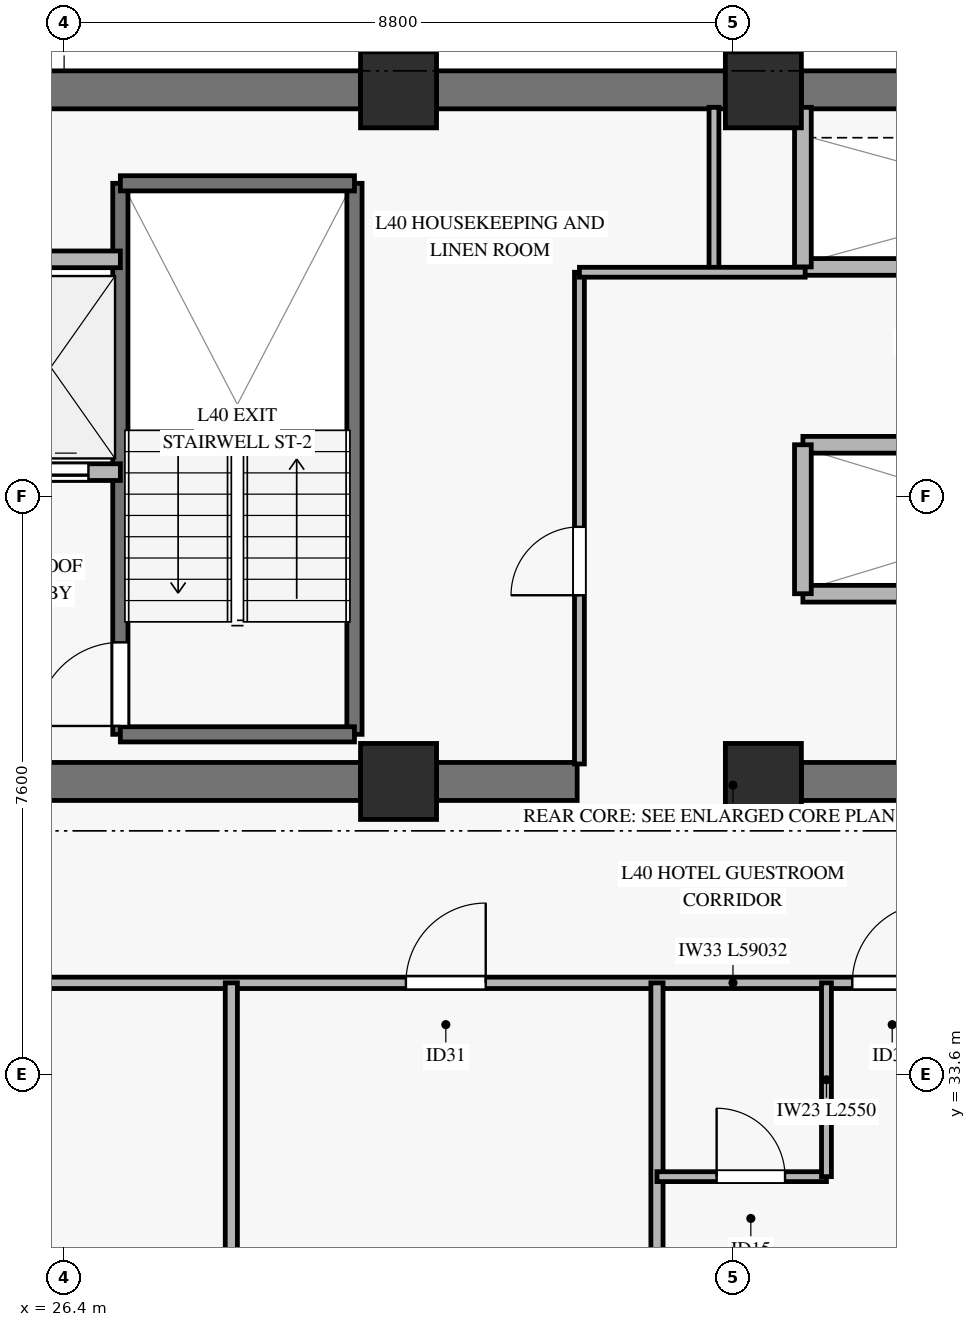
"""IFC4 building model, lengths in metres.
Left out: names, types, materials, properties, quantities, classifications, styles, units other than length and angle.
Written with IfcOpenShell. Run it as: python <this file> out.ifc"""

import sys

from ifc_helpers import new_model, si_unit, direction, frame, frame_2d, origin, origin_2d, place, context, subcontext, project, spatial, rectangle, extrude, source, transform, mapped, element, fill, save


model = new_model("IFC4")
c1 = context("Model", 3, precision=1e-05, world=origin(), true_north=direction((0.0, 1.0)))
c2 = subcontext(c1, "Body", "Model", "MODEL_VIEW")
j1 = project(units=[si_unit("LENGTHUNIT", "METRE"), si_unit("PLANEANGLEUNIT", "RADIAN")], contexts=[c1])
p1 = place(None, origin())
s1 = spatial("IfcSite", under=j1, at=p1, CompositionType="ELEMENT")
p2 = place(p1, origin())
s2 = spatial("IfcBuilding", under=s1, at=p2, CompositionType="ELEMENT")
p3 = place(p2, frame((0.0, 0.0, 163.2)))
s3 = spatial("IfcBuildingStorey", under=s2, at=p3, CompositionType="ELEMENT", Elevation=163.2)
m1 = source(origin(), c2, "Body", "SweptSolid", [
    extrude(rectangle(XDim=1.0, YDim=1.0, at=origin_2d()), origin(), (0.0, 0.0, 1.0), 3.27),
])
for number, where, z_axis, x_axis in (
    (1, (30.8, 37.45, 0.0), (0.0, 0.0, 1.0), (1.0, 0.0, 0.0)),
    (2, (30.8, 46.55, 0.0), (0.0, 0.0, 1.0), (1.0, 0.0, 0.0)),
    (3, (35.6, 37.45, 0.0), (0.0, 0.0, 1.0), (1.0, 0.0, 0.0)),
    (4, (35.6, 46.55, 0.0), (0.0, 0.0, 1.0), (1.0, 0.0, 0.0)),
):
    element("IfcColumn", number, at=place(p3, frame(where, z_axis=z_axis, x_axis=x_axis)), inside=s3, PredefinedType="PILASTER", context=c2, shape_type="MappedRepresentation", body=[
        mapped(m1, transform((0.0, 0.0, 0.0), x_axis=(1.0, 0.0, 0.0), y_axis=(0.0, 1.0, 0.0), z_axis=(0.0, 0.0, 1.0), scale=1.0)),
    ])
p4 = place(p3, frame((20.35, 46.55, 0.0), z_axis=(0.0, 0.0, 1.0), x_axis=(1.0, 0.0, 0.0)))
e5 = element("IfcWall", 5, at=p4, inside=s3, PredefinedType="SHEAR", context=c2, shape_type="SweptSolid", body=[
    extrude(rectangle(XDim=9.95, YDim=0.5, at=frame_2d((4.975, 0.0))), origin(), (0.0, 0.0, 1.0), 3.27),
])
p5 = place(p3, frame((31.3, 46.55, 0.0), z_axis=(0.0, 0.0, 1.0), x_axis=(1.0, 0.0, 0.0)))
e6 = element("IfcWall", 6, at=p5, inside=s3, PredefinedType="SHEAR", context=c2, shape_type="SweptSolid", body=[
    extrude(rectangle(XDim=3.8, YDim=0.5, at=frame_2d((1.9, 0.0))), origin(), (0.0, 0.0, 1.0), 3.27),
])
p6 = place(p3, frame((36.1, 46.55, 0.0), z_axis=(0.0, 0.0, 1.0), x_axis=(1.0, 0.0, 0.0)))
e7 = element("IfcWall", 7, at=p6, inside=s3, PredefinedType="SHEAR", context=c2, shape_type="SweptSolid", body=[
    extrude(rectangle(XDim=7.7, YDim=0.5, at=frame_2d((3.85, 0.0))), origin(), (0.0, 0.0, 1.0), 3.27),
])
p7 = place(p3, frame((20.35, 37.45, 0.0), z_axis=(0.0, 0.0, 1.0), x_axis=(1.0, 0.0, 0.0)))
e8 = element("IfcWall", 8, at=p7, inside=s3, PredefinedType="SHEAR", context=c2, shape_type="SweptSolid", body=[
    extrude(rectangle(XDim=9.95, YDim=0.5, at=frame_2d((4.975, 0.0))), origin(), (0.0, 0.0, 1.0), 3.27),
])
p8 = place(p7, frame((4.2, 0.0, 0.0)))
e9 = element("IfcOpeningElement", 9, at=p8, cuts=e8, PredefinedType="OPENING", context=c2, shape_type="SweptSolid", body=[
    extrude(rectangle(XDim=1.2, YDim=2.15, at=frame_2d((0.6, 1.075))), frame((0.0, 0.26, 0.0), z_axis=(0.0, -1.0, 0.0), x_axis=(1.0, 0.0, 0.0)), (0.0, 0.0, 1.0), 0.52),
])
p9 = place(p3, frame((31.3, 37.45, 0.0), z_axis=(0.0, 0.0, 1.0), x_axis=(1.0, 0.0, 0.0)))
e10 = element("IfcWall", 10, at=p9, inside=s3, PredefinedType="SHEAR", context=c2, shape_type="SweptSolid", body=[
    extrude(rectangle(XDim=1.85, YDim=0.5, at=frame_2d((0.925, 0.0))), origin(), (0.0, 0.0, 1.0), 3.27),
])
p10 = place(p3, frame((36.1, 37.45, 0.0), z_axis=(0.0, 0.0, 1.0), x_axis=(1.0, 0.0, 0.0)))
e11 = element("IfcWall", 11, at=p10, inside=s3, PredefinedType="SHEAR", context=c2, shape_type="SweptSolid", body=[
    extrude(rectangle(XDim=7.7, YDim=0.5, at=frame_2d((3.85, 0.0))), origin(), (0.0, 0.0, 1.0), 3.27),
])
p11 = place(p3, frame((27.14, 38.07, 0.0), z_axis=(0.0, 0.0, 1.0), x_axis=(0.0, 1.0, 0.0)))
e12 = element("IfcWall", 12, at=p11, inside=s3, PredefinedType="SOLIDWALL", context=c2, shape_type="SweptSolid", body=[
    extrude(rectangle(XDim=7.25, YDim=0.2, at=frame_2d((3.625, 0.0))), origin(), (0.0, 0.0, 1.0), 3.5),
])
p12 = place(p11, frame((0.11, 0.0, 0.0)))
e13 = element("IfcOpeningElement", 13, at=p12, cuts=e12, PredefinedType="OPENING", context=c2, shape_type="SweptSolid", body=[
    extrude(rectangle(XDim=1.1, YDim=2.15, at=frame_2d((0.55, 1.075))), frame((0.0, 0.11, 0.0), z_axis=(0.0, -1.0, 0.0), x_axis=(1.0, 0.0, 0.0)), (0.0, 0.0, 1.0), 0.22),
])
p13 = place(p3, frame((30.22, 38.07, 0.0), z_axis=(0.0, 0.0, 1.0), x_axis=(0.0, 1.0, 0.0)))
e14 = element("IfcWall", 14, at=p13, inside=s3, PredefinedType="SOLIDWALL", context=c2, shape_type="SweptSolid", body=[
    extrude(rectangle(XDim=7.25, YDim=0.2, at=frame_2d((3.625, 0.0))), origin(), (0.0, 0.0, 1.0), 3.5),
])
for number, where, z_axis, x_axis in (
    (15, (27.14, 45.32, 0.0), (0.0, 0.0, 1.0), (1.0, 0.0, 0.0)),
    (16, (27.14, 38.07, 0.0), (0.0, 0.0, 1.0), (1.0, 0.0, 0.0)),
):
    element("IfcWall", number, at=place(p3, frame(where, z_axis=z_axis, x_axis=x_axis)), inside=s3, PredefinedType="SOLIDWALL", context=c2, shape_type="SweptSolid", body=[
        extrude(rectangle(XDim=3.08, YDim=0.2, at=frame_2d((1.54, 0.0))), origin(), (0.0, 0.0, 1.0), 3.5),
    ])
p14 = place(p3, frame((23.22, 41.52, 0.0), z_axis=(0.0, 0.0, 1.0), x_axis=(1.0, 0.0, 0.0)))
e17 = element("IfcWall", 17, at=p14, inside=s3, PredefinedType="SOLIDWALL", context=c2, shape_type="SweptSolid", body=[
    extrude(rectangle(XDim=3.92, YDim=0.22, at=frame_2d((1.96, 0.0))), origin(), (0.0, 0.0, 1.0), 3.27),
])
p15 = place(p14, frame((0.5, 0.0, 0.0)))
e18 = element("IfcOpeningElement", 18, at=p15, cuts=e17, PredefinedType="OPENING", context=c2, shape_type="SweptSolid", body=[
    extrude(rectangle(XDim=1.1, YDim=2.2, at=frame_2d((0.55, 1.1))), frame((0.0, 0.12, 0.0), z_axis=(0.0, -1.0, 0.0), x_axis=(1.0, 0.0, 0.0)), (0.0, 0.0, 1.0), 0.24),
])
p16 = place(p14, frame((2.4, 0.0, 0.0)))
e19 = element("IfcOpeningElement", 19, at=p16, cuts=e17, PredefinedType="OPENING", context=c2, shape_type="SweptSolid", body=[
    extrude(rectangle(XDim=1.1, YDim=2.2, at=frame_2d((0.55, 1.1))), frame((0.0, 0.12, 0.0), z_axis=(0.0, -1.0, 0.0), x_axis=(1.0, 0.0, 0.0)), (0.0, 0.0, 1.0), 0.24),
])
p17 = place(p3, frame((23.22, 44.32, 0.0), z_axis=(0.0, 0.0, 1.0), x_axis=(1.0, 0.0, 0.0)))
e20 = element("IfcWall", 20, at=p17, inside=s3, PredefinedType="SOLIDWALL", context=c2, shape_type="SweptSolid", body=[
    extrude(rectangle(XDim=3.92, YDim=0.22, at=frame_2d((1.96, 0.0))), origin(), (0.0, 0.0, 1.0), 3.27),
])
p18 = place(p3, frame((36.12, 44.22, 0.0), z_axis=(0.0, 0.0, 1.0), x_axis=(1.0, 0.0, 0.0)))
e21 = element("IfcWall", 21, at=p18, inside=s3, PredefinedType="SOLIDWALL", context=c2, shape_type="SweptSolid", body=[
    extrude(rectangle(XDim=6.2, YDim=0.22, at=frame_2d((3.1, 0.0))), origin(), (0.0, 0.0, 1.0), 3.27),
])
p19 = place(p18, frame((3.28, 0.0, 0.0)))
e22 = element("IfcOpeningElement", 22, at=p19, cuts=e21, PredefinedType="OPENING", context=c2, shape_type="SweptSolid", body=[
    extrude(rectangle(XDim=1.1, YDim=2.2, at=frame_2d((0.55, 1.1))), frame((0.0, 0.12, 0.0), z_axis=(0.0, -1.0, 0.0), x_axis=(1.0, 0.0, 0.0)), (0.0, 0.0, 1.0), 0.24),
])
p20 = place(p18, frame((4.77, 0.0, 0.0)))
e23 = element("IfcOpeningElement", 23, at=p20, cuts=e21, PredefinedType="OPENING", context=c2, shape_type="SweptSolid", body=[
    extrude(rectangle(XDim=1.1, YDim=2.2, at=frame_2d((0.55, 1.1))), frame((0.0, 0.12, 0.0), z_axis=(0.0, -1.0, 0.0), x_axis=(1.0, 0.0, 0.0)), (0.0, 0.0, 1.0), 0.24),
])
p21 = place(p3, frame((36.12, 41.88, 0.0), z_axis=(0.0, 0.0, 1.0), x_axis=(1.0, 0.0, 0.0)))
e24 = element("IfcWall", 24, at=p21, inside=s3, PredefinedType="SOLIDWALL", context=c2, shape_type="SweptSolid", body=[
    extrude(rectangle(XDim=6.2, YDim=0.22, at=frame_2d((3.1, 0.0))), origin(), (0.0, 0.0, 1.0), 3.27),
])
p22 = place(p21, frame((3.28, 0.0, 0.0)))
e25 = element("IfcOpeningElement", 25, at=p22, cuts=e24, PredefinedType="OPENING", context=c2, shape_type="SweptSolid", body=[
    extrude(rectangle(XDim=1.1, YDim=2.2, at=frame_2d((0.55, 1.1))), frame((0.0, 0.12, 0.0), z_axis=(0.0, -1.0, 0.0), x_axis=(1.0, 0.0, 0.0)), (0.0, 0.0, 1.0), 0.24),
])
p23 = place(p21, frame((4.77, 0.0, 0.0)))
e26 = element("IfcOpeningElement", 26, at=p23, cuts=e24, PredefinedType="OPENING", context=c2, shape_type="SweptSolid", body=[
    extrude(rectangle(XDim=1.1, YDim=2.2, at=frame_2d((0.55, 1.1))), frame((0.0, 0.12, 0.0), z_axis=(0.0, -1.0, 0.0), x_axis=(1.0, 0.0, 0.0)), (0.0, 0.0, 1.0), 0.24),
])
p24 = place(p3, frame((36.12, 39.92, 0.0), z_axis=(0.0, 0.0, 1.0), x_axis=(1.0, 0.0, 0.0)))
e27 = element("IfcWall", 27, at=p24, inside=s3, PredefinedType="SOLIDWALL", context=c2, shape_type="SweptSolid", body=[
    extrude(rectangle(XDim=8.6, YDim=0.22, at=frame_2d((4.3, 0.0))), origin(), (0.0, 0.0, 1.0), 2.555),
])
p25 = place(p3, frame((36.12, 39.92, 0.0), z_axis=(0.0, 0.0, 1.0), x_axis=(0.0, 1.0, 0.0)))
e28 = element("IfcWall", 28, at=p25, inside=s3, PredefinedType="SOLIDWALL", context=c2, shape_type="SweptSolid", body=[
    extrude(rectangle(XDim=1.96, YDim=0.22, at=frame_2d((0.98, 0.0))), origin(), (0.0, 0.0, 1.0), 3.27),
])
p26 = place(p3, frame((36.12, 44.22, 0.0), z_axis=(0.0, 0.0, 1.0), x_axis=(0.0, 1.0, 0.0)))
e29 = element("IfcWall", 29, at=p26, inside=s3, PredefinedType="SOLIDWALL", context=c2, shape_type="SweptSolid", body=[
    extrude(rectangle(XDim=2.1, YDim=0.22, at=frame_2d((1.05, 0.0))), origin(), (0.0, 0.0, 1.0), 3.27),
])
p27 = place(p3, frame((33.18, 37.68, 0.0), z_axis=(0.0, 0.0, 1.0), x_axis=(0.0, 1.0, 0.0)))
e30 = element("IfcWall", 30, at=p27, inside=s3, PredefinedType="PARTITIONING", context=c2, shape_type="SweptSolid", body=[
    extrude(rectangle(XDim=6.47, YDim=0.13, at=frame_2d((3.235, 0.0))), origin(), (0.0, 0.0, 1.0), 2.355),
])
p28 = place(p27, frame((2.22, 0.0, 0.0)))
e31 = element("IfcOpeningElement", 31, at=p28, cuts=e30, PredefinedType="OPENING", context=c2, shape_type="SweptSolid", body=[
    extrude(rectangle(XDim=0.9, YDim=2.1, at=frame_2d((0.45, 1.05))), frame((0.0, 0.075, 0.0), z_axis=(0.0, -1.0, 0.0), x_axis=(1.0, 0.0, 0.0)), (0.0, 0.0, 1.0), 0.15),
])
p29 = place(p3, frame((34.95, 44.15, 0.0), z_axis=(0.0, 0.0, 1.0), x_axis=(0.0, 1.0, 0.0)))
e32 = element("IfcWall", 32, at=p29, inside=s3, PredefinedType="PARTITIONING", context=c2, shape_type="SweptSolid", body=[
    extrude(rectangle(XDim=2.17, YDim=0.13, at=frame_2d((1.085, 0.0))), origin(), (0.0, 0.0, 1.0), 3.27),
])
p30 = place(p3, frame((33.18, 44.15, 0.0), z_axis=(0.0, 0.0, 1.0), x_axis=(1.0, 0.0, 0.0)))
e33 = element("IfcWall", 33, at=p30, inside=s3, PredefinedType="PARTITIONING", context=c2, shape_type="SweptSolid", body=[
    extrude(rectangle(XDim=2.97, YDim=0.13, at=frame_2d((1.485, 0.0))), origin(), (0.0, 0.0, 1.0), 2.555),
])
p31 = place(p3, frame((5.684, 34.8, 0.0), z_axis=(0.0, 0.0, 1.0), x_axis=(1.0, 0.0, 0.0)))
e34 = element("IfcWall", 34, at=p31, inside=s3, PredefinedType="PARTITIONING", context=c2, shape_type="SweptSolid", body=[
    extrude(rectangle(XDim=59.032, YDim=0.15, at=frame_2d((29.516, 0.0))), origin(), (0.0, 0.0, 1.0), 2.455),
])
p32 = place(p31, frame((6.645, 0.0, 0.0)))
e35 = element("IfcOpeningElement", 35, at=p32, cuts=e34, PredefinedType="OPENING", context=c2, shape_type="SweptSolid", body=[
    extrude(rectangle(XDim=1.05, YDim=2.15, at=frame_2d((0.525, 1.075))), frame((0.0, 0.085, 0.0), z_axis=(0.0, -1.0, 0.0), x_axis=(1.0, 0.0, 0.0)), (0.0, 0.0, 1.0), 0.17),
])
p33 = place(p31, frame((19.241, 0.0, 0.0)))
e36 = element("IfcOpeningElement", 36, at=p33, cuts=e34, PredefinedType="OPENING", context=c2, shape_type="SweptSolid", body=[
    extrude(rectangle(XDim=1.05, YDim=2.15, at=frame_2d((0.525, 1.075))), frame((0.0, 0.085, 0.0), z_axis=(0.0, -1.0, 0.0), x_axis=(1.0, 0.0, 0.0)), (0.0, 0.0, 1.0), 0.17),
])
p34 = place(p31, frame((25.213, 0.0, 0.0)))
e37 = element("IfcOpeningElement", 37, at=p34, cuts=e34, PredefinedType="OPENING", context=c2, shape_type="SweptSolid", body=[
    extrude(rectangle(XDim=1.05, YDim=2.15, at=frame_2d((0.525, 1.075))), frame((0.0, 0.085, 0.0), z_axis=(0.0, -1.0, 0.0), x_axis=(1.0, 0.0, 0.0)), (0.0, 0.0, 1.0), 0.17),
])
p35 = place(p31, frame((31.086, 0.0, 0.0)))
e38 = element("IfcOpeningElement", 38, at=p35, cuts=e34, PredefinedType="OPENING", context=c2, shape_type="SweptSolid", body=[
    extrude(rectangle(XDim=1.05, YDim=2.15, at=frame_2d((0.525, 1.075))), frame((0.0, 0.085, 0.0), z_axis=(0.0, -1.0, 0.0), x_axis=(1.0, 0.0, 0.0)), (0.0, 0.0, 1.0), 0.17),
])
p36 = place(p31, frame((36.632, 0.0, 0.0)))
e39 = element("IfcOpeningElement", 39, at=p36, cuts=e34, PredefinedType="OPENING", context=c2, shape_type="SweptSolid", body=[
    extrude(rectangle(XDim=1.05, YDim=2.15, at=frame_2d((0.525, 1.075))), frame((0.0, 0.085, 0.0), z_axis=(0.0, -1.0, 0.0), x_axis=(1.0, 0.0, 0.0)), (0.0, 0.0, 1.0), 0.17),
])
p37 = place(p31, frame((47.025, 0.0, 0.0)))
e40 = element("IfcOpeningElement", 40, at=p37, cuts=e34, PredefinedType="OPENING", context=c2, shape_type="SweptSolid", body=[
    extrude(rectangle(XDim=1.05, YDim=2.15, at=frame_2d((0.525, 1.075))), frame((0.0, 0.085, 0.0), z_axis=(0.0, -1.0, 0.0), x_axis=(1.0, 0.0, 0.0)), (0.0, 0.0, 1.0), 0.17),
])
for number, where, z_axis, x_axis in (
    (41, (28.6, 9.098, 0.0), (0.0, 0.0, 1.0), (0.0, 1.0, 0.0)),
    (42, (34.2, 9.098, 0.0), (0.0, 0.0, 1.0), (0.0, 1.0, 0.0)),
):
    element("IfcWall", number, at=place(p3, frame(where, z_axis=z_axis, x_axis=x_axis)), inside=s3, PredefinedType="PARTITIONING", context=c2, shape_type="SweptSolid", body=[
        extrude(rectangle(XDim=25.702, YDim=0.16, at=frame_2d((12.851, 0.0))), origin(), (0.0, 0.0, 1.0), 2.755),
    ])
p38 = place(p3, frame((34.2, 32.25, 0.0), z_axis=(0.0, 0.0, 1.0), x_axis=(1.0, 0.0, 0.0)))
e43 = element("IfcWall", 43, at=p38, inside=s3, PredefinedType="PARTITIONING", context=c2, shape_type="SweptSolid", body=[
    extrude(rectangle(XDim=2.23, YDim=0.13, at=frame_2d((1.115, 0.0))), origin(), (0.0, 0.0, 1.0), 3.27),
])
p39 = place(p38, frame((0.785, 0.0, 0.0)))
e44 = element("IfcOpeningElement", 44, at=p39, cuts=e43, PredefinedType="OPENING", context=c2, shape_type="SweptSolid", body=[
    extrude(rectangle(XDim=0.9, YDim=2.1, at=frame_2d((0.45, 1.05))), frame((0.0, 0.075, 0.0), z_axis=(0.0, -1.0, 0.0), x_axis=(1.0, 0.0, 0.0)), (0.0, 0.0, 1.0), 0.15),
])
p40 = place(p3, frame((36.43, 32.25, 0.0), z_axis=(0.0, 0.0, 1.0), x_axis=(0.0, 1.0, 0.0)))
e45 = element("IfcWall", 45, at=p40, inside=s3, PredefinedType="PARTITIONING", context=c2, shape_type="SweptSolid", body=[
    extrude(rectangle(XDim=2.55, YDim=0.13, at=frame_2d((1.275, 0.0))), origin(), (0.0, 0.0, 1.0), 2.805),
])
m2 = source(origin(), c2, "Body", "SweptSolid", [
    extrude(rectangle(XDim=1.1, YDim=2.15, at=frame_2d((0.55, 1.075))), frame((0.0, 0.025, 0.0), z_axis=(0.0, -1.0, 0.0), x_axis=(1.0, 0.0, 0.0)), (0.0, 0.0, 1.0), 0.05),
])
p41 = place(p12, origin())
e46 = element("IfcDoor", 46, at=p41, inside=s3, OperationType="SINGLE_SWING_LEFT", PredefinedType="DOOR", context=c2, shape_type="MappedRepresentation", body=[
    mapped(m2, transform((0.0, 0.0, 0.0), x_axis=(1.0, 0.0, 0.0), y_axis=(0.0, 1.0, 0.0), z_axis=(0.0, 0.0, 1.0), scale=1.0)),
])
fill(e13, e46)
m3 = source(origin(), c2, "Body", "SweptSolid", [
    extrude(rectangle(XDim=1.1, YDim=2.2, at=frame_2d((0.55, 1.1))), frame((0.0, 0.025, 0.0), z_axis=(0.0, -1.0, 0.0), x_axis=(1.0, 0.0, 0.0)), (0.0, 0.0, 1.0), 0.05),
])
p42 = place(p16, origin())
e47 = element("IfcDoor", 47, at=p42, inside=s3, OperationType="SLIDING_TO_LEFT", PredefinedType="DOOR", context=c2, shape_type="MappedRepresentation", body=[
    mapped(m3, transform((0.0, 0.0, 0.0), x_axis=(1.0, 0.0, 0.0), y_axis=(0.0, 1.0, 0.0), z_axis=(0.0, 0.0, 1.0), scale=1.0)),
])
fill(e19, e47)
m4 = source(origin(), c2, "Body", "SweptSolid", [
    extrude(rectangle(XDim=0.9, YDim=2.1, at=frame_2d((0.45, 1.05))), frame((0.0, 0.025, 0.0), z_axis=(0.0, -1.0, 0.0), x_axis=(1.0, 0.0, 0.0)), (0.0, 0.0, 1.0), 0.05),
])
p43 = place(p28, origin())
e48 = element("IfcDoor", 48, at=p43, inside=s3, OperationType="SINGLE_SWING_LEFT", PredefinedType="DOOR", context=c2, shape_type="MappedRepresentation", body=[
    mapped(m4, transform((0.0, 0.0, 0.0), x_axis=(1.0, 0.0, 0.0), y_axis=(0.0, 1.0, 0.0), z_axis=(0.0, 0.0, 1.0), scale=1.0)),
])
fill(e31, e48)
m5 = source(origin(), c2, "Body", "SweptSolid", [
    extrude(rectangle(XDim=1.05, YDim=2.15, at=frame_2d((0.525, 1.075))), frame((0.0, 0.025, 0.0), z_axis=(0.0, -1.0, 0.0), x_axis=(1.0, 0.0, 0.0)), (0.0, 0.0, 1.0), 0.05),
])
p44 = place(p34, origin())
e49 = element("IfcDoor", 49, at=p44, inside=s3, OperationType="SINGLE_SWING_RIGHT", PredefinedType="DOOR", context=c2, shape_type="MappedRepresentation", body=[
    mapped(m5, transform((0.0, 0.0, 0.0), x_axis=(1.0, 0.0, 0.0), y_axis=(0.0, 1.0, 0.0), z_axis=(0.0, 0.0, 1.0), scale=1.0)),
])
fill(e37, e49)
p45 = place(p35, origin())
e50 = element("IfcDoor", 50, at=p45, inside=s3, OperationType="SINGLE_SWING_RIGHT", PredefinedType="DOOR", context=c2, shape_type="MappedRepresentation", body=[
    mapped(m5, transform((0.0, 0.0, 0.0), x_axis=(1.0, 0.0, 0.0), y_axis=(0.0, 1.0, 0.0), z_axis=(0.0, 0.0, 1.0), scale=1.0)),
])
fill(e38, e50)
p46 = place(p39, origin())
e51 = element("IfcDoor", 51, at=p46, inside=s3, OperationType="SINGLE_SWING_LEFT", PredefinedType="DOOR", context=c2, shape_type="MappedRepresentation", body=[
    mapped(m4, transform((0.0, 0.0, 0.0), x_axis=(1.0, 0.0, 0.0), y_axis=(0.0, 1.0, 0.0), z_axis=(0.0, 0.0, 1.0), scale=1.0)),
])
fill(e44, e51)
save(model, sys.argv[1])
